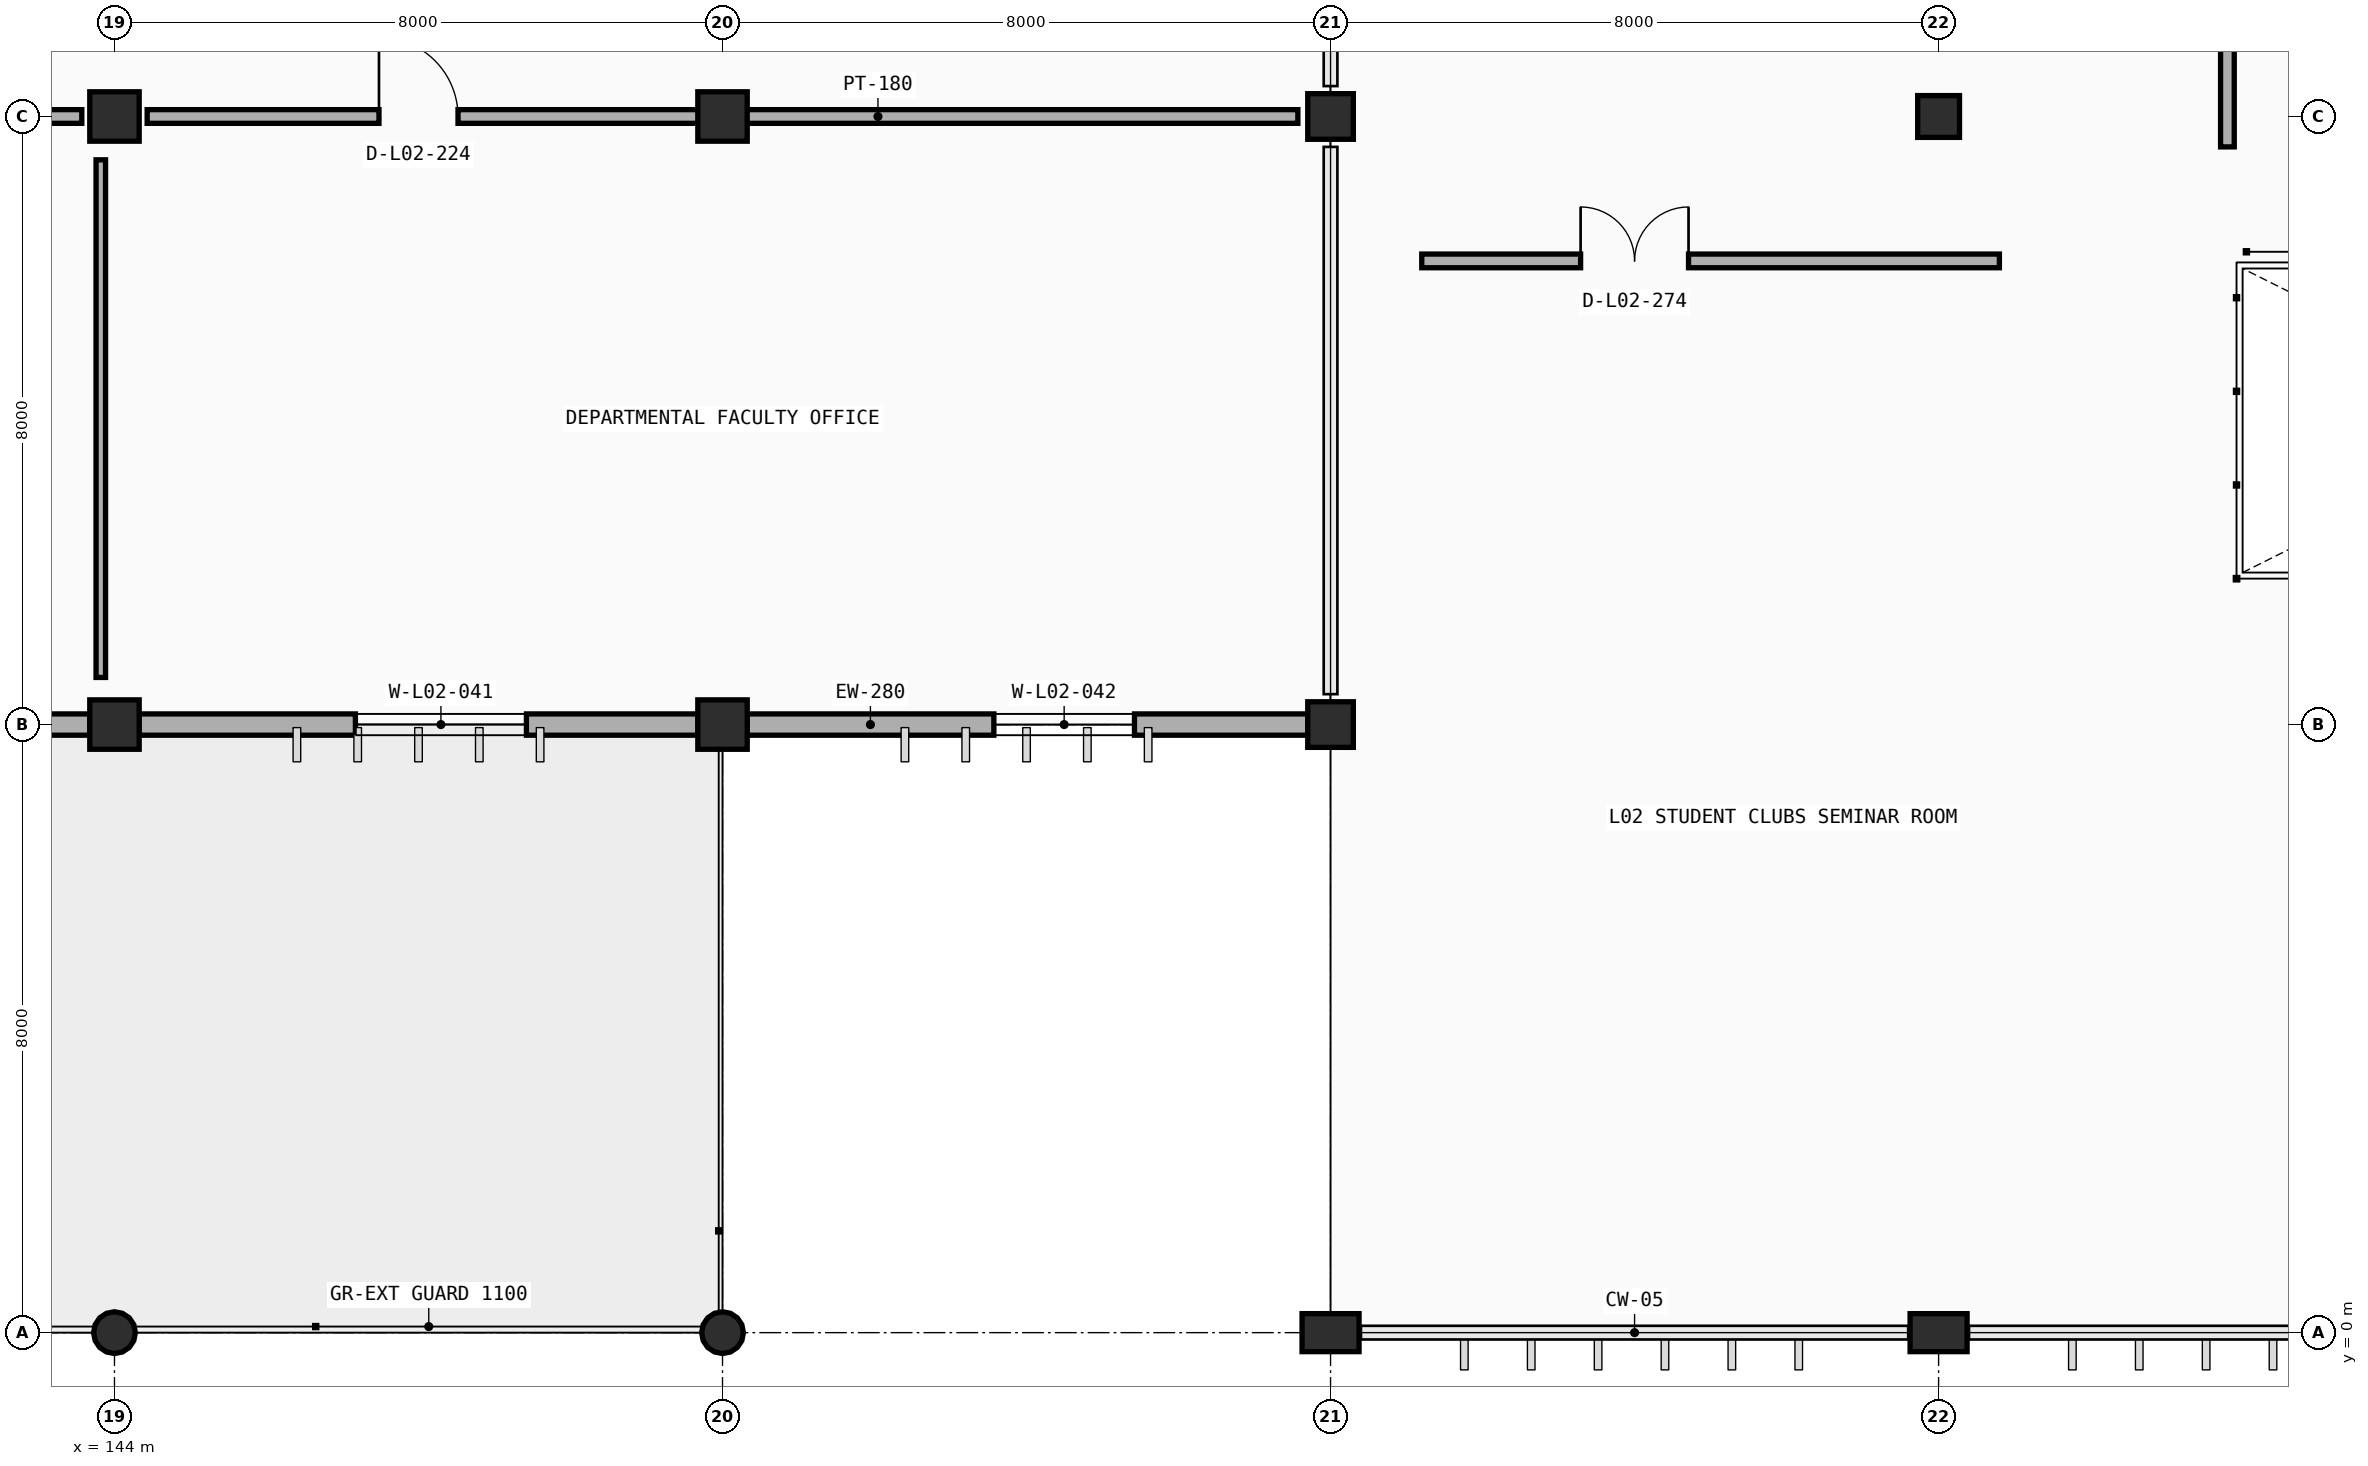
"""IFC4 building model, lengths in metres.
Left out: names, types, materials, properties, quantities, classifications, styles, units other than length and angle.
Written with IfcOpenShell. Run it as: python <this file> out.ifc"""

import sys

from ifc_helpers import new_model, si_unit, direction, frame, frame_2d, origin, origin_2d, place, context, subcontext, project, spatial, rectangle, circle, extrude, element, fill, save


model = new_model("IFC4")
c1 = context("Model", 3, precision=1e-05, world=origin(), true_north=direction((0.0, 1.0)))
c2 = subcontext(c1, "Body", "Model", "MODEL_VIEW")
j1 = project(units=[si_unit("LENGTHUNIT", "METRE"), si_unit("PLANEANGLEUNIT", "RADIAN")], contexts=[c1])
p1 = place(None, origin())
s1 = spatial("IfcSite", under=j1, at=p1, CompositionType="ELEMENT")
p2 = place(p1, origin())
s2 = spatial("IfcBuilding", under=s1, at=p2, CompositionType="ELEMENT")
p3 = place(p2, frame((0.0, 0.0, 4.8)))
s3 = spatial("IfcBuildingStorey", under=s2, at=p3, CompositionType="ELEMENT", Elevation=4.8)
for number, where, z_axis, x_axis in (
    (1, (144.0, 0.0, 0.0), (0.0, 0.0, 1.0), (1.0, 0.0, 0.0)),
    (2, (152.0, 0.0, 0.0), (0.0, 0.0, 1.0), (1.0, 0.0, 0.0)),
):
    element("IfcColumn", number, at=place(p3, frame(where, z_axis=z_axis, x_axis=x_axis)), inside=s3, PredefinedType="PILASTER", context=c2, shape_type="SweptSolid", body=[
        extrude(circle(Radius=0.275, at=origin_2d()), origin(), (0.0, 0.0, 1.0), 4.8),
    ])
for number, where, z_axis, x_axis in (
    (3, (160.0, 0.0, 0.0), (0.0, 0.0, 1.0), (0.0, 1.0, 0.0)),
    (4, (168.0, 0.0, 0.0), (0.0, 0.0, 1.0), (0.0, 1.0, 0.0)),
):
    element("IfcColumn", number, at=place(p3, frame(where, z_axis=z_axis, x_axis=x_axis)), inside=s3, PredefinedType="COLUMN", context=c2, shape_type="SweptSolid", body=[
        extrude(rectangle(XDim=0.5, YDim=0.75, at=origin_2d()), origin(), (0.0, 0.0, 1.0), 4.8),
    ])
for number, where, z_axis, x_axis in (
    (5, (144.0, 8.0, 0.0), (0.0, 0.0, 1.0), (1.0, 0.0, 0.0)),
    (6, (152.0, 8.0, 0.0), (0.0, 0.0, 1.0), (1.0, 0.0, 0.0)),
):
    element("IfcColumn", number, at=place(p3, frame(where, z_axis=z_axis, x_axis=x_axis)), inside=s3, PredefinedType="COLUMN", context=c2, shape_type="SweptSolid", body=[
        extrude(rectangle(XDim=0.65, YDim=0.65, at=origin_2d()), origin(), (0.0, 0.0, 1.0), 4.8),
    ])
p4 = place(p3, frame((160.0, 8.0, 0.0), z_axis=(0.0, 0.0, 1.0), x_axis=(1.0, 0.0, 0.0)))
e7 = element("IfcColumn", 7, at=p4, inside=s3, PredefinedType="COLUMN", context=c2, shape_type="SweptSolid", body=[
    extrude(rectangle(XDim=0.6, YDim=0.6, at=origin_2d()), origin(), (0.0, 0.0, 1.0), 4.8),
])
for number, where, z_axis, x_axis in (
    (8, (144.0, 16.0, 0.0), (0.0, 0.0, 1.0), (1.0, 0.0, 0.0)),
    (9, (152.0, 16.0, 0.0), (0.0, 0.0, 1.0), (1.0, 0.0, 0.0)),
):
    element("IfcColumn", number, at=place(p3, frame(where, z_axis=z_axis, x_axis=x_axis)), inside=s3, PredefinedType="COLUMN", context=c2, shape_type="SweptSolid", body=[
        extrude(rectangle(XDim=0.65, YDim=0.65, at=origin_2d()), origin(), (0.0, 0.0, 1.0), 4.8),
    ])
p5 = place(p3, frame((160.0, 16.0, 0.0), z_axis=(0.0, 0.0, 1.0), x_axis=(1.0, 0.0, 0.0)))
e10 = element("IfcColumn", 10, at=p5, inside=s3, PredefinedType="COLUMN", context=c2, shape_type="SweptSolid", body=[
    extrude(rectangle(XDim=0.6, YDim=0.6, at=origin_2d()), origin(), (0.0, 0.0, 1.0), 4.8),
])
p6 = place(p3, frame((168.0, 16.0, 0.0), z_axis=(0.0, 0.0, 1.0), x_axis=(1.0, 0.0, 0.0)))
e11 = element("IfcColumn", 11, at=p6, inside=s3, PredefinedType="COLUMN", context=c2, shape_type="SweptSolid", body=[
    extrude(rectangle(XDim=0.55, YDim=0.55, at=origin_2d()), origin(), (0.0, 0.0, 1.0), 4.8),
])
p7 = place(p3, frame((143.678, 8.0, 0.0), z_axis=(0.0, 0.0, 1.0), x_axis=(-1.0, 0.0, 0.0)))
e12 = element("IfcWall", 12, at=p7, inside=s3, PredefinedType="STANDARD", context=c2, shape_type="SweptSolid", body=[
    extrude(rectangle(XDim=7.356, YDim=0.28, at=frame_2d((3.678, 0.0))), origin(), (0.0, 0.0, 1.0), 3.91),
])
p8 = place(p7, frame((2.858, 0.0, 0.0)))
e13 = element("IfcOpeningElement", 13, at=p8, cuts=e12, PredefinedType="OPENING", context=c2, shape_type="SweptSolid", body=[
    extrude(rectangle(XDim=1.45, YDim=2.25, at=frame_2d((0.725, 1.125))), frame((0.0, 0.15, 0.0), z_axis=(0.0, -1.0, 0.0), x_axis=(1.0, 0.0, 0.0)), (0.0, 0.0, 1.0), 0.3),
])
p9 = place(p3, frame((151.678, 8.0, 0.0), z_axis=(0.0, 0.0, 1.0), x_axis=(-1.0, 0.0, 0.0)))
e14 = element("IfcWall", 14, at=p9, inside=s3, PredefinedType="STANDARD", context=c2, shape_type="SweptSolid", body=[
    extrude(rectangle(XDim=7.356, YDim=0.28, at=frame_2d((3.678, 0.0))), origin(), (0.0, 0.0, 1.0), 3.91),
])
p10 = place(p9, frame((2.258, 0.0, 0.9)))
e15 = element("IfcOpeningElement", 15, at=p10, cuts=e14, PredefinedType="OPENING", context=c2, shape_type="SweptSolid", body=[
    extrude(rectangle(XDim=2.25, YDim=1.25, at=frame_2d((1.125, 0.625))), frame((0.0, 0.15, 0.0), z_axis=(0.0, -1.0, 0.0), x_axis=(1.0, 0.0, 0.0)), (0.0, 0.0, 1.0), 0.3),
])
p11 = place(p3, frame((159.703, 8.0, 0.0), z_axis=(0.0, 0.0, 1.0), x_axis=(-1.0, 0.0, 0.0)))
e16 = element("IfcWall", 16, at=p11, inside=s3, PredefinedType="STANDARD", context=c2, shape_type="SweptSolid", body=[
    extrude(rectangle(XDim=7.381, YDim=0.28, at=frame_2d((3.69, 0.0))), origin(), (0.0, 0.0, 1.0), 3.91),
])
p12 = place(p11, frame((2.283, 0.0, 0.9)))
e17 = element("IfcOpeningElement", 17, at=p12, cuts=e16, PredefinedType="OPENING", context=c2, shape_type="SweptSolid", body=[
    extrude(rectangle(XDim=1.85, YDim=1.25, at=frame_2d((0.925, 0.625))), frame((0.0, 0.15, 0.0), z_axis=(0.0, -1.0, 0.0), x_axis=(1.0, 0.0, 0.0)), (0.0, 0.0, 1.0), 0.3),
])
p13 = place(p3, frame((128.43, 16.0, 0.0), z_axis=(0.0, 0.0, 1.0), x_axis=(1.0, 0.0, 0.0)))
e18 = element("IfcWall", 18, at=p13, inside=s3, PredefinedType="PARTITIONING", context=c2, shape_type="SweptSolid", body=[
    extrude(rectangle(XDim=15.14, YDim=0.18, at=frame_2d((7.57, 0.0))), origin(), (0.0, 0.0, 1.0), 3.86),
])
p14 = place(p13, frame((2.66, 0.0, 0.0)))
e19 = element("IfcOpeningElement", 19, at=p14, cuts=e18, PredefinedType="OPENING", context=c2, shape_type="SweptSolid", body=[
    extrude(rectangle(XDim=1.82, YDim=2.25, at=frame_2d((0.91, 1.125))), frame((0.0, 0.1, 0.0), z_axis=(0.0, -1.0, 0.0), x_axis=(1.0, 0.0, 0.0)), (0.0, 0.0, 1.0), 0.2),
])
p15 = place(p3, frame((143.82, 8.62, 0.0), z_axis=(0.0, 0.0, 1.0), x_axis=(0.0, 1.0, 0.0)))
e20 = element("IfcWall", 20, at=p15, inside=s3, PredefinedType="PARTITIONING", context=c2, shape_type="SweptSolid", body=[
    extrude(rectangle(XDim=6.81, YDim=0.125, at=frame_2d((3.405, 0.0))), origin(), (0.0, 0.0, 1.0), 3.76),
])
p16 = place(p3, frame((144.43, 16.0, 0.0), z_axis=(0.0, 0.0, 1.0), x_axis=(1.0, 0.0, 0.0)))
e21 = element("IfcWall", 21, at=p16, inside=s3, PredefinedType="PARTITIONING", context=c2, shape_type="SweptSolid", body=[
    extrude(rectangle(XDim=15.14, YDim=0.18, at=frame_2d((7.57, 0.0))), origin(), (0.0, 0.0, 1.0), 3.86),
])
p17 = place(p16, frame((3.05, 0.0, 0.0)))
e22 = element("IfcOpeningElement", 22, at=p17, cuts=e21, PredefinedType="OPENING", context=c2, shape_type="SweptSolid", body=[
    extrude(rectangle(XDim=1.04, YDim=2.15, at=frame_2d((0.52, 1.075))), frame((0.0, 0.1, 0.0), z_axis=(0.0, -1.0, 0.0), x_axis=(1.0, 0.0, 0.0)), (0.0, 0.0, 1.0), 0.2),
])
p18 = place(p3, frame((171.8, 15.6, 0.0), z_axis=(0.0, 0.0, 1.0), x_axis=(0.0, 1.0, 0.0)))
e23 = element("IfcWall", 23, at=p18, inside=s3, PredefinedType="PARTITIONING", context=c2, shape_type="SweptSolid", body=[
    extrude(rectangle(XDim=7.6, YDim=0.18, at=frame_2d((3.8, 0.0))), origin(), (0.0, 0.0, 1.0), 3.9),
])
p19 = place(p18, frame((3.63, 0.0, 0.0)))
e24 = element("IfcOpeningElement", 24, at=p19, cuts=e23, PredefinedType="OPENING", context=c2, shape_type="SweptSolid", body=[
    extrude(rectangle(XDim=1.54, YDim=2.2, at=frame_2d((0.77, 1.1))), frame((0.0, 0.1, 0.0), z_axis=(0.0, -1.0, 0.0), x_axis=(1.0, 0.0, 0.0)), (0.0, 0.0, 1.0), 0.2),
])
p20 = place(p3, frame((161.2, 14.1, 0.0), z_axis=(0.0, 0.0, 1.0), x_axis=(1.0, 0.0, 0.0)))
e25 = element("IfcWall", 25, at=p20, inside=s3, PredefinedType="PARTITIONING", context=c2, shape_type="SweptSolid", body=[
    extrude(rectangle(XDim=7.6, YDim=0.18, at=frame_2d((3.8, 0.0))), origin(), (0.0, 0.0, 1.0), 3.9),
])
p21 = place(p20, frame((2.09, 0.0, 0.0)))
e26 = element("IfcOpeningElement", 26, at=p21, cuts=e25, PredefinedType="OPENING", context=c2, shape_type="SweptSolid", body=[
    extrude(rectangle(XDim=1.42, YDim=2.2, at=frame_2d((0.71, 1.1))), frame((0.0, 0.1, 0.0), z_axis=(0.0, -1.0, 0.0), x_axis=(1.0, 0.0, 0.0)), (0.0, 0.0, 1.0), 0.2),
])
p22 = place(p10, origin())
e27 = element("IfcWindow", 27, at=p22, inside=s3, PartitioningType="DOUBLE_PANEL_VERTICAL", PredefinedType="WINDOW", context=c2, shape_type="SweptSolid", body=[
    extrude(rectangle(XDim=2.25, YDim=1.25, at=frame_2d((1.125, 0.625))), frame((0.0, 0.03, 0.0), z_axis=(0.0, -1.0, 0.0), x_axis=(1.0, 0.0, 0.0)), (0.0, 0.0, 1.0), 0.06),
])
fill(e15, e27)
p23 = place(p12, origin())
e28 = element("IfcWindow", 28, at=p23, inside=s3, PartitioningType="DOUBLE_PANEL_VERTICAL", PredefinedType="WINDOW", context=c2, shape_type="SweptSolid", body=[
    extrude(rectangle(XDim=1.85, YDim=1.25, at=frame_2d((0.925, 0.625))), frame((0.0, 0.03, 0.0), z_axis=(0.0, -1.0, 0.0), x_axis=(1.0, 0.0, 0.0)), (0.0, 0.0, 1.0), 0.06),
])
fill(e17, e28)
p24 = place(p17, origin())
e29 = element("IfcDoor", 29, at=p24, inside=s3, OperationType="SINGLE_SWING_LEFT", PredefinedType="DOOR", context=c2, shape_type="SweptSolid", body=[
    extrude(rectangle(XDim=1.04, YDim=2.15, at=frame_2d((0.52, 1.075))), frame((0.0, 0.025, 0.0), z_axis=(0.0, -1.0, 0.0), x_axis=(1.0, 0.0, 0.0)), (0.0, 0.0, 1.0), 0.05),
])
fill(e22, e29)
p25 = place(p21, origin())
e30 = element("IfcDoor", 30, at=p25, inside=s3, OperationType="DOUBLE_DOOR_SINGLE_SWING", PredefinedType="DOOR", context=c2, shape_type="SweptSolid", body=[
    extrude(rectangle(XDim=1.42, YDim=2.2, at=frame_2d((0.71, 1.1))), frame((0.0, 0.025, 0.0), z_axis=(0.0, -1.0, 0.0), x_axis=(1.0, 0.0, 0.0)), (0.0, 0.0, 1.0), 0.05),
])
fill(e26, e30)
save(model, sys.argv[1])
